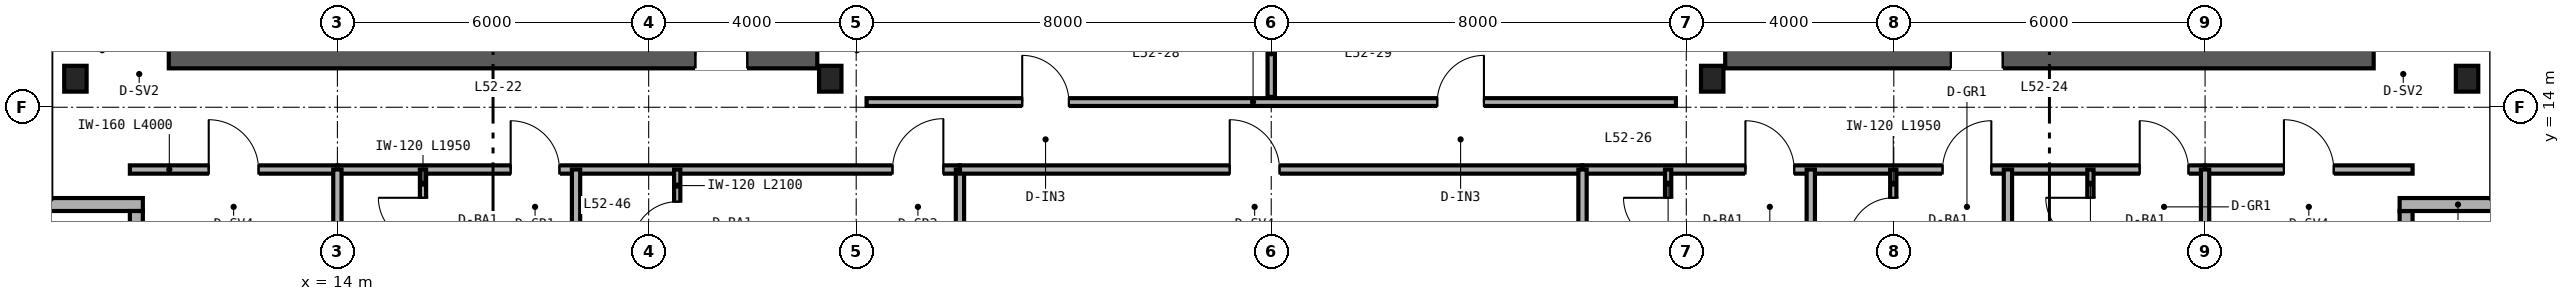
"""IFC4 building model, lengths in metres.
Left out: names, types, materials, properties, quantities, classifications, styles, units other than length and angle.
Written with IfcOpenShell. Run it as: python <this file> out.ifc"""

import sys

from ifc_helpers import new_model, si_unit, direction, frame, frame_2d, origin, origin_2d, place, context, subcontext, project, spatial, rectangle, i_section, extrude, source, transform, mapped, element, fill, save


model = new_model("IFC4")
c1 = context("Model", 3, precision=1e-05, world=origin(), true_north=direction((0.0, 1.0)))
c2 = subcontext(c1, "Body", "Model", "MODEL_VIEW")
j1 = project(units=[si_unit("LENGTHUNIT", "METRE"), si_unit("PLANEANGLEUNIT", "RADIAN")], contexts=[c1])
p1 = place(None, origin())
s1 = spatial("IfcSite", under=j1, at=p1, CompositionType="ELEMENT")
p2 = place(p1, origin())
s2 = spatial("IfcBuilding", under=s1, at=p2, CompositionType="ELEMENT")
p3 = place(p2, frame((0.0, 0.0, 206.4)))
s3 = spatial("IfcBuildingStorey", under=s2, at=p3, CompositionType="ELEMENT", Elevation=206.4)
p4 = place(p3, frame((10.75, 15.0, 0.0), z_axis=(0.0, 0.0, 1.0), x_axis=(1.0, 0.0, 0.0)))
e1 = element("IfcWall", 1, at=p4, inside=s3, PredefinedType="SHEAR", context=c2, shape_type="SweptSolid", body=[
    extrude(rectangle(XDim=12.5, YDim=0.5, at=frame_2d((6.25, 0.0))), origin(), (0.0, 0.0, 1.0), 3.37),
])
p5 = place(p4, frame((10.15, 0.0, 0.0)))
e2 = element("IfcOpeningElement", 2, at=p5, cuts=e1, PredefinedType="OPENING", context=c2, shape_type="SweptSolid", body=[
    extrude(rectangle(XDim=1.0, YDim=2.15, at=frame_2d((0.5, 1.075))), frame((0.0, 0.26, 0.0), z_axis=(0.0, -1.0, 0.0), x_axis=(1.0, 0.0, 0.0)), (0.0, 0.0, 1.0), 0.52),
])
p6 = place(p3, frame((40.75, 15.0, 0.0), z_axis=(0.0, 0.0, 1.0), x_axis=(1.0, 0.0, 0.0)))
e3 = element("IfcWall", 3, at=p6, inside=s3, PredefinedType="SHEAR", context=c2, shape_type="SweptSolid", body=[
    extrude(rectangle(XDim=12.5, YDim=0.5, at=frame_2d((6.25, 0.0))), origin(), (0.0, 0.0, 1.0), 3.37),
])
p7 = place(p6, frame((4.35, 0.0, 0.0)))
e4 = element("IfcOpeningElement", 4, at=p7, cuts=e3, PredefinedType="OPENING", context=c2, shape_type="SweptSolid", body=[
    extrude(rectangle(XDim=1.0, YDim=2.15, at=frame_2d((0.5, 1.075))), frame((0.0, 0.26, 0.0), z_axis=(0.0, -1.0, 0.0), x_axis=(1.0, 0.0, 0.0)), (0.0, 0.0, 1.0), 0.52),
])
m1 = source(origin(), c2, "Body", "SweptSolid", [
    extrude(i_section(OverallWidth=0.432, OverallDepth=0.498, WebThickness=0.056, FlangeThickness=0.089, FilletRadius=0.025, at=origin_2d()), origin(), (0.0, 0.0, 1.0), 3.37),
])
for number, where, z_axis, x_axis in (
    (5, (8.95, 14.55, 0.0), (0.0, 0.0, 1.0), (1.0, 0.0, 0.0)),
    (6, (23.5, 14.55, 0.0), (0.0, 0.0, 1.0), (1.0, 0.0, 0.0)),
    (7, (40.5, 14.55, 0.0), (0.0, 0.0, 1.0), (1.0, 0.0, 0.0)),
    (8, (55.05, 14.55, 0.0), (0.0, 0.0, 1.0), (1.0, 0.0, 0.0)),
):
    element("IfcColumn", number, at=place(p3, frame(where, z_axis=z_axis, x_axis=x_axis)), inside=s3, PredefinedType="COLUMN", context=c2, shape_type="MappedRepresentation", body=[
        mapped(m1, transform((0.0, 0.0, 0.0), scale=1.0)),
    ])
p8 = place(p3, frame((53.875, 10.0, 0.0), z_axis=(0.0, 0.0, 1.0), x_axis=(0.0, 1.0, 0.0)))
e9 = element("IfcWall", 9, at=p8, inside=s3, PredefinedType="SOLIDWALL", context=c2, shape_type="SweptSolid", body=[
    extrude(rectangle(XDim=2.0, YDim=0.25, at=frame_2d((1.0, 0.0))), origin(), (0.0, 0.0, 1.0), 3.37),
])
for number, where, z_axis, x_axis in (
    (10, (53.75, 12.125, 0.0), (0.0, 0.0, 1.0), (1.0, 0.0, 0.0)),
    (11, (8.0, 12.125, 0.0), (0.0, 0.0, 1.0), (1.0, 0.0, 0.0)),
):
    element("IfcWall", number, at=place(p3, frame(where, z_axis=z_axis, x_axis=x_axis)), inside=s3, PredefinedType="SOLIDWALL", context=c2, shape_type="SweptSolid", body=[
        extrude(rectangle(XDim=2.25, YDim=0.25, at=frame_2d((1.125, 0.0))), origin(), (0.0, 0.0, 1.0), 3.37),
    ])
p9 = place(p3, frame((10.125, 12.0, 0.0), z_axis=(0.0, 0.0, 1.0), x_axis=(0.0, -1.0, 0.0)))
e12 = element("IfcWall", 12, at=p9, inside=s3, PredefinedType="SOLIDWALL", context=c2, shape_type="SweptSolid", body=[
    extrude(rectangle(XDim=2.0, YDim=0.25, at=frame_2d((1.0, 0.0))), origin(), (0.0, 0.0, 1.0), 3.37),
])
p10 = place(p3, frame((24.2, 14.1, 0.0), z_axis=(0.0, 0.0, 1.0), x_axis=(1.0, 0.0, 0.0)))
e13 = element("IfcWall", 13, at=p10, inside=s3, PredefinedType="PARTITIONING", context=c2, shape_type="SweptSolid", body=[
    extrude(rectangle(XDim=15.6, YDim=0.15, at=frame_2d((7.8, 0.0))), origin(), (0.0, 0.0, 1.0), 3.37),
])
p11 = place(p10, frame((3.0, 0.0, 0.0)))
e14 = element("IfcOpeningElement", 14, at=p11, cuts=e13, PredefinedType="OPENING", context=c2, shape_type="SweptSolid", body=[
    extrude(rectangle(XDim=0.9, YDim=2.15, at=frame_2d((0.45, 1.075))), frame((0.0, 0.085, 0.0), z_axis=(0.0, -1.0, 0.0), x_axis=(1.0, 0.0, 0.0)), (0.0, 0.0, 1.0), 0.17),
])
p12 = place(p10, frame((11.0, 0.0, 0.0)))
e15 = element("IfcOpeningElement", 15, at=p12, cuts=e13, PredefinedType="OPENING", context=c2, shape_type="SweptSolid", body=[
    extrude(rectangle(XDim=0.9, YDim=2.15, at=frame_2d((0.45, 1.075))), frame((0.0, 0.085, 0.0), z_axis=(0.0, -1.0, 0.0), x_axis=(1.0, 0.0, 0.0)), (0.0, 0.0, 1.0), 0.17),
])
p13 = place(p3, frame((32.0, 14.2, 0.0), z_axis=(0.0, 0.0, 1.0), x_axis=(0.0, 1.0, 0.0)))
e16 = element("IfcWall", 16, at=p13, inside=s3, PredefinedType="PARTITIONING", context=c2, shape_type="SweptSolid", body=[
    extrude(rectangle(XDim=1.68, YDim=0.142, at=frame_2d((0.84, 0.0))), origin(), (0.0, 0.0, 1.0), 3.37),
])
p14 = place(p3, frame((10.0, 12.8, 0.0), z_axis=(0.0, 0.0, 1.0), x_axis=(1.0, 0.0, 0.0)))
e17 = element("IfcWall", 17, at=p14, inside=s3, PredefinedType="PARTITIONING", context=c2, shape_type="SweptSolid", body=[
    extrude(rectangle(XDim=4.0, YDim=0.16, at=frame_2d((2.0, 0.0))), origin(), (0.0, 0.0, 1.0), 3.37),
])
p15 = place(p14, frame((1.52, 0.0, 0.0)))
e18 = element("IfcOpeningElement", 18, at=p15, cuts=e17, PredefinedType="OPENING", context=c2, shape_type="SweptSolid", body=[
    extrude(rectangle(XDim=0.96, YDim=2.15, at=frame_2d((0.48, 1.075))), frame((0.0, 0.09, 0.0), z_axis=(0.0, -1.0, 0.0), x_axis=(1.0, 0.0, 0.0)), (0.0, 0.0, 1.0), 0.18),
])
p16 = place(p3, frame((50.0, 12.8, 0.0), z_axis=(0.0, 0.0, 1.0), x_axis=(1.0, 0.0, 0.0)))
e19 = element("IfcWall", 19, at=p16, inside=s3, PredefinedType="PARTITIONING", context=c2, shape_type="SweptSolid", body=[
    extrude(rectangle(XDim=4.0, YDim=0.16, at=frame_2d((2.0, 0.0))), origin(), (0.0, 0.0, 1.0), 3.37),
])
p17 = place(p16, frame((1.52, 0.0, 0.0)))
e20 = element("IfcOpeningElement", 20, at=p17, cuts=e19, PredefinedType="OPENING", context=c2, shape_type="SweptSolid", body=[
    extrude(rectangle(XDim=0.96, YDim=2.15, at=frame_2d((0.48, 1.075))), frame((0.0, 0.09, 0.0), z_axis=(0.0, -1.0, 0.0), x_axis=(1.0, 0.0, 0.0)), (0.0, 0.0, 1.0), 0.18),
])
p18 = place(p3, frame((14.0, 12.8, 0.0), z_axis=(0.0, 0.0, 1.0), x_axis=(1.0, 0.0, 0.0)))
e21 = element("IfcWall", 21, at=p18, inside=s3, PredefinedType="PARTITIONING", context=c2, shape_type="SweptSolid", body=[
    extrude(rectangle(XDim=12.0, YDim=0.16, at=frame_2d((6.0, 0.0))), origin(), (0.0, 0.0, 1.0), 2.913),
])
p19 = place(p18, frame((3.34, 0.0, 0.0)))
e22 = element("IfcOpeningElement", 22, at=p19, cuts=e21, PredefinedType="OPENING", context=c2, shape_type="SweptSolid", body=[
    extrude(rectangle(XDim=0.94, YDim=2.15, at=frame_2d((0.47, 1.075))), frame((0.0, 0.09, 0.0), z_axis=(0.0, -1.0, 0.0), x_axis=(1.0, 0.0, 0.0)), (0.0, 0.0, 1.0), 0.18),
])
p20 = place(p18, frame((10.7, 0.0, 0.0)))
e23 = element("IfcOpeningElement", 23, at=p20, cuts=e21, PredefinedType="OPENING", context=c2, shape_type="SweptSolid", body=[
    extrude(rectangle(XDim=0.98, YDim=2.2, at=frame_2d((0.49, 1.1))), frame((0.0, 0.09, 0.0), z_axis=(0.0, -1.0, 0.0), x_axis=(1.0, 0.0, 0.0)), (0.0, 0.0, 1.0), 0.18),
])
p21 = place(p3, frame((14.0, 6.36, 0.0), z_axis=(0.0, 0.0, 1.0), x_axis=(0.0, 1.0, 0.0)))
e24 = element("IfcWall", 24, at=p21, inside=s3, PredefinedType="PARTITIONING", context=c2, shape_type="SweptSolid", body=[
    extrude(rectangle(XDim=6.44, YDim=0.16, at=frame_2d((3.22, 0.0))), origin(), (0.0, 0.0, 1.0), 2.677),
])
p22 = place(p3, frame((26.0, 6.36, 0.0), z_axis=(0.0, 0.0, 1.0), x_axis=(0.0, 1.0, 0.0)))
e25 = element("IfcWall", 25, at=p22, inside=s3, PredefinedType="PARTITIONING", context=c2, shape_type="SweptSolid", body=[
    extrude(rectangle(XDim=6.44, YDim=0.16, at=frame_2d((3.22, 0.0))), origin(), (0.0, 0.0, 1.0), 2.443),
])
p23 = place(p3, frame((18.6, 6.36, 0.0), z_axis=(0.0, 0.0, 1.0), x_axis=(0.0, 1.0, 0.0)))
e26 = element("IfcWall", 26, at=p23, inside=s3, PredefinedType="PARTITIONING", context=c2, shape_type="SweptSolid", body=[
    extrude(rectangle(XDim=6.44, YDim=0.16, at=frame_2d((3.22, 0.0))), origin(), (0.0, 0.0, 1.0), 2.677),
])
p24 = place(p3, frame((15.65, 10.85, 0.0), z_axis=(0.0, 0.0, 1.0), x_axis=(0.0, 1.0, 0.0)))
e27 = element("IfcWall", 27, at=p24, inside=s3, PredefinedType="PARTITIONING", context=c2, shape_type="SweptSolid", body=[
    extrude(rectangle(XDim=1.95, YDim=0.12, at=frame_2d((0.975, 0.0))), origin(), (0.0, 0.0, 1.0), 3.37),
])
p25 = place(p24, frame((0.545, 0.0, 0.0)))
e28 = element("IfcOpeningElement", 28, at=p25, cuts=e27, PredefinedType="OPENING", context=c2, shape_type="SweptSolid", body=[
    extrude(rectangle(XDim=0.86, YDim=2.1, at=frame_2d((0.43, 1.05))), frame((0.0, 0.07, 0.0), z_axis=(0.0, -1.0, 0.0), x_axis=(1.0, 0.0, 0.0)), (0.0, 0.0, 1.0), 0.14),
])
p26 = place(p3, frame((20.55, 10.7, 0.0), z_axis=(0.0, 0.0, 1.0), x_axis=(0.0, 1.0, 0.0)))
e29 = element("IfcWall", 29, at=p26, inside=s3, PredefinedType="PARTITIONING", context=c2, shape_type="SweptSolid", body=[
    extrude(rectangle(XDim=2.1, YDim=0.12, at=frame_2d((1.05, 0.0))), origin(), (0.0, 0.0, 1.0), 3.37),
])
p27 = place(p26, frame((0.62, 0.0, 0.0)))
e30 = element("IfcOpeningElement", 30, at=p27, cuts=e29, PredefinedType="OPENING", context=c2, shape_type="SweptSolid", body=[
    extrude(rectangle(XDim=0.86, YDim=2.1, at=frame_2d((0.43, 1.05))), frame((0.0, 0.07, 0.0), z_axis=(0.0, -1.0, 0.0), x_axis=(1.0, 0.0, 0.0)), (0.0, 0.0, 1.0), 0.14),
])
p28 = place(p3, frame((26.0, 12.8, 0.0), z_axis=(0.0, 0.0, 1.0), x_axis=(1.0, 0.0, 0.0)))
e31 = element("IfcWall", 31, at=p28, inside=s3, PredefinedType="PARTITIONING", context=c2, shape_type="SweptSolid", body=[
    extrude(rectangle(XDim=12.0, YDim=0.16, at=frame_2d((6.0, 0.0))), origin(), (0.0, 0.0, 1.0), 3.37),
])
p29 = place(p28, frame((5.2, 0.0, 0.0)))
e32 = element("IfcOpeningElement", 32, at=p29, cuts=e31, PredefinedType="OPENING", context=c2, shape_type="SweptSolid", body=[
    extrude(rectangle(XDim=0.96, YDim=2.15, at=frame_2d((0.48, 1.075))), frame((0.0, 0.09, 0.0), z_axis=(0.0, -1.0, 0.0), x_axis=(1.0, 0.0, 0.0)), (0.0, 0.0, 1.0), 0.18),
])
p30 = place(p3, frame((38.0, 12.8, 0.0), z_axis=(0.0, 0.0, 1.0), x_axis=(1.0, 0.0, 0.0)))
e33 = element("IfcWall", 33, at=p30, inside=s3, PredefinedType="PARTITIONING", context=c2, shape_type="SweptSolid", body=[
    extrude(rectangle(XDim=12.0, YDim=0.16, at=frame_2d((6.0, 0.0))), origin(), (0.0, 0.0, 1.0), 2.913),
])
p31 = place(p30, frame((3.14, 0.0, 0.0)))
e34 = element("IfcOpeningElement", 34, at=p31, cuts=e33, PredefinedType="OPENING", context=c2, shape_type="SweptSolid", body=[
    extrude(rectangle(XDim=0.94, YDim=2.15, at=frame_2d((0.47, 1.075))), frame((0.0, 0.09, 0.0), z_axis=(0.0, -1.0, 0.0), x_axis=(1.0, 0.0, 0.0)), (0.0, 0.0, 1.0), 0.18),
])
p32 = place(p30, frame((6.94, 0.0, 0.0)))
e35 = element("IfcOpeningElement", 35, at=p32, cuts=e33, PredefinedType="OPENING", context=c2, shape_type="SweptSolid", body=[
    extrude(rectangle(XDim=0.94, YDim=2.15, at=frame_2d((0.47, 1.075))), frame((0.0, 0.09, 0.0), z_axis=(0.0, -1.0, 0.0), x_axis=(1.0, 0.0, 0.0)), (0.0, 0.0, 1.0), 0.18),
])
p33 = place(p30, frame((10.74, 0.0, 0.0)))
e36 = element("IfcOpeningElement", 36, at=p33, cuts=e33, PredefinedType="OPENING", context=c2, shape_type="SweptSolid", body=[
    extrude(rectangle(XDim=0.94, YDim=2.15, at=frame_2d((0.47, 1.075))), frame((0.0, 0.09, 0.0), z_axis=(0.0, -1.0, 0.0), x_axis=(1.0, 0.0, 0.0)), (0.0, 0.0, 1.0), 0.18),
])
p34 = place(p3, frame((38.0, 6.36, 0.0), z_axis=(0.0, 0.0, 1.0), x_axis=(0.0, 1.0, 0.0)))
e37 = element("IfcWall", 37, at=p34, inside=s3, PredefinedType="PARTITIONING", context=c2, shape_type="SweptSolid", body=[
    extrude(rectangle(XDim=6.44, YDim=0.16, at=frame_2d((3.22, 0.0))), origin(), (0.0, 0.0, 1.0), 2.443),
])
p35 = place(p3, frame((50.0, 6.36, 0.0), z_axis=(0.0, 0.0, 1.0), x_axis=(0.0, 1.0, 0.0)))
e38 = element("IfcWall", 38, at=p35, inside=s3, PredefinedType="PARTITIONING", context=c2, shape_type="SweptSolid", body=[
    extrude(rectangle(XDim=6.44, YDim=0.16, at=frame_2d((3.22, 0.0))), origin(), (0.0, 0.0, 1.0), 2.677),
])
p36 = place(p3, frame((42.4, 6.36, 0.0), z_axis=(0.0, 0.0, 1.0), x_axis=(0.0, 1.0, 0.0)))
e39 = element("IfcWall", 39, at=p36, inside=s3, PredefinedType="PARTITIONING", context=c2, shape_type="SweptSolid", body=[
    extrude(rectangle(XDim=6.44, YDim=0.16, at=frame_2d((3.22, 0.0))), origin(), (0.0, 0.0, 1.0), 2.833),
])
p37 = place(p3, frame((39.65, 10.85, 0.0), z_axis=(0.0, 0.0, 1.0), x_axis=(0.0, 1.0, 0.0)))
e40 = element("IfcWall", 40, at=p37, inside=s3, PredefinedType="PARTITIONING", context=c2, shape_type="SweptSolid", body=[
    extrude(rectangle(XDim=1.95, YDim=0.12, at=frame_2d((0.975, 0.0))), origin(), (0.0, 0.0, 1.0), 3.37),
])
p38 = place(p37, frame((0.545, 0.0, 0.0)))
e41 = element("IfcOpeningElement", 41, at=p38, cuts=e40, PredefinedType="OPENING", context=c2, shape_type="SweptSolid", body=[
    extrude(rectangle(XDim=0.86, YDim=2.1, at=frame_2d((0.43, 1.05))), frame((0.0, 0.07, 0.0), z_axis=(0.0, -1.0, 0.0), x_axis=(1.0, 0.0, 0.0)), (0.0, 0.0, 1.0), 0.14),
])
p39 = place(p3, frame((46.2, 6.36, 0.0), z_axis=(0.0, 0.0, 1.0), x_axis=(0.0, 1.0, 0.0)))
e42 = element("IfcWall", 42, at=p39, inside=s3, PredefinedType="PARTITIONING", context=c2, shape_type="SweptSolid", body=[
    extrude(rectangle(XDim=6.44, YDim=0.16, at=frame_2d((3.22, 0.0))), origin(), (0.0, 0.0, 1.0), 2.677),
])
p40 = place(p3, frame((43.99, 10.85, 0.0), z_axis=(0.0, 0.0, 1.0), x_axis=(0.0, 1.0, 0.0)))
e43 = element("IfcWall", 43, at=p40, inside=s3, PredefinedType="PARTITIONING", context=c2, shape_type="SweptSolid", body=[
    extrude(rectangle(XDim=1.95, YDim=0.12, at=frame_2d((0.975, 0.0))), origin(), (0.0, 0.0, 1.0), 3.37),
])
p41 = place(p40, frame((0.545, 0.0, 0.0)))
e44 = element("IfcOpeningElement", 44, at=p41, cuts=e43, PredefinedType="OPENING", context=c2, shape_type="SweptSolid", body=[
    extrude(rectangle(XDim=0.86, YDim=2.1, at=frame_2d((0.43, 1.05))), frame((0.0, 0.07, 0.0), z_axis=(0.0, -1.0, 0.0), x_axis=(1.0, 0.0, 0.0)), (0.0, 0.0, 1.0), 0.14),
])
p42 = place(p3, frame((47.79, 10.85, 0.0), z_axis=(0.0, 0.0, 1.0), x_axis=(0.0, 1.0, 0.0)))
e45 = element("IfcWall", 45, at=p42, inside=s3, PredefinedType="PARTITIONING", context=c2, shape_type="SweptSolid", body=[
    extrude(rectangle(XDim=1.95, YDim=0.12, at=frame_2d((0.975, 0.0))), origin(), (0.0, 0.0, 1.0), 3.37),
])
p43 = place(p42, frame((0.545, 0.0, 0.0)))
e46 = element("IfcOpeningElement", 46, at=p43, cuts=e45, PredefinedType="OPENING", context=c2, shape_type="SweptSolid", body=[
    extrude(rectangle(XDim=0.86, YDim=2.1, at=frame_2d((0.43, 1.05))), frame((0.0, 0.07, 0.0), z_axis=(0.0, -1.0, 0.0), x_axis=(1.0, 0.0, 0.0)), (0.0, 0.0, 1.0), 0.14),
])
m2 = source(origin(), c2, "Body", "SweptSolid", [
    extrude(rectangle(XDim=1.0, YDim=2.15, at=frame_2d((0.5, 1.075))), frame((0.0, 0.025, 0.0), z_axis=(0.0, -1.0, 0.0), x_axis=(1.0, 0.0, 0.0)), (0.0, 0.0, 1.0), 0.05),
])
p44 = place(p5, origin())
e47 = element("IfcDoor", 47, at=p44, inside=s3, OperationType="SINGLE_SWING_LEFT", PredefinedType="DOOR", context=c2, shape_type="MappedRepresentation", body=[
    mapped(m2, transform((0.0, 0.0, 0.0), scale=1.0)),
])
fill(e2, e47)
p45 = place(p7, origin())
e48 = element("IfcDoor", 48, at=p45, inside=s3, OperationType="SINGLE_SWING_RIGHT", PredefinedType="DOOR", context=c2, shape_type="MappedRepresentation", body=[
    mapped(m2, transform((0.0, 0.0, 0.0), scale=1.0)),
])
fill(e4, e48)
m3 = source(origin(), c2, "Body", "SweptSolid", [
    extrude(rectangle(XDim=0.9, YDim=2.15, at=frame_2d((0.45, 1.075))), frame((0.0, 0.025, 0.0), z_axis=(0.0, -1.0, 0.0), x_axis=(1.0, 0.0, 0.0)), (0.0, 0.0, 1.0), 0.05),
])
p46 = place(p11, origin())
e49 = element("IfcDoor", 49, at=p46, inside=s3, OperationType="SINGLE_SWING_LEFT", PredefinedType="DOOR", context=c2, shape_type="MappedRepresentation", body=[
    mapped(m3, transform((0.0, 0.0, 0.0), scale=1.0)),
])
fill(e14, e49)
p47 = place(p12, origin())
e50 = element("IfcDoor", 50, at=p47, inside=s3, OperationType="SINGLE_SWING_RIGHT", PredefinedType="DOOR", context=c2, shape_type="MappedRepresentation", body=[
    mapped(m3, transform((0.0, 0.0, 0.0), scale=1.0)),
])
fill(e15, e50)
m4 = source(origin(), c2, "Body", "SweptSolid", [
    extrude(rectangle(XDim=0.96, YDim=2.15, at=frame_2d((0.48, 1.075))), frame((0.0, 0.025, 0.0), z_axis=(0.0, -1.0, 0.0), x_axis=(1.0, 0.0, 0.0)), (0.0, 0.0, 1.0), 0.05),
])
p48 = place(p15, origin())
e51 = element("IfcDoor", 51, at=p48, inside=s3, OperationType="SINGLE_SWING_LEFT", PredefinedType="DOOR", context=c2, shape_type="MappedRepresentation", body=[
    mapped(m4, transform((0.0, 0.0, 0.0), scale=1.0)),
])
fill(e18, e51)
p49 = place(p17, origin())
e52 = element("IfcDoor", 52, at=p49, inside=s3, OperationType="SINGLE_SWING_LEFT", PredefinedType="DOOR", context=c2, shape_type="MappedRepresentation", body=[
    mapped(m4, transform((0.0, 0.0, 0.0), scale=1.0)),
])
fill(e20, e52)
m5 = source(origin(), c2, "Body", "SweptSolid", [
    extrude(rectangle(XDim=0.86, YDim=2.1, at=frame_2d((0.43, 1.05))), frame((0.0, 0.025, 0.0), z_axis=(0.0, -1.0, 0.0), x_axis=(1.0, 0.0, 0.0)), (0.0, 0.0, 1.0), 0.05),
])
p50 = place(p25, origin())
e53 = element("IfcDoor", 53, at=p50, inside=s3, OperationType="SINGLE_SWING_RIGHT", PredefinedType="DOOR", context=c2, shape_type="MappedRepresentation", body=[
    mapped(m5, transform((0.0, 0.0, 0.0), scale=1.0)),
])
fill(e28, e53)
p51 = place(p27, origin())
e54 = element("IfcDoor", 54, at=p51, inside=s3, OperationType="SINGLE_SWING_LEFT", PredefinedType="DOOR", context=c2, shape_type="MappedRepresentation", body=[
    mapped(m5, transform((0.0, 0.0, 0.0), scale=1.0)),
])
fill(e30, e54)
m6 = source(origin(), c2, "Body", "SweptSolid", [
    extrude(rectangle(XDim=0.94, YDim=2.15, at=frame_2d((0.47, 1.075))), frame((0.0, 0.025, 0.0), z_axis=(0.0, -1.0, 0.0), x_axis=(1.0, 0.0, 0.0)), (0.0, 0.0, 1.0), 0.05),
])
p52 = place(p19, origin())
e55 = element("IfcDoor", 55, at=p52, inside=s3, OperationType="SINGLE_SWING_LEFT", PredefinedType="DOOR", context=c2, shape_type="MappedRepresentation", body=[
    mapped(m6, transform((0.0, 0.0, 0.0), scale=1.0)),
])
fill(e22, e55)
m7 = source(origin(), c2, "Body", "SweptSolid", [
    extrude(rectangle(XDim=0.98, YDim=2.2, at=frame_2d((0.49, 1.1))), frame((0.0, 0.025, 0.0), z_axis=(0.0, -1.0, 0.0), x_axis=(1.0, 0.0, 0.0)), (0.0, 0.0, 1.0), 0.05),
])
p53 = place(p20, origin())
e56 = element("IfcDoor", 56, at=p53, inside=s3, OperationType="SINGLE_SWING_RIGHT", PredefinedType="DOOR", context=c2, shape_type="MappedRepresentation", body=[
    mapped(m7, transform((0.0, 0.0, 0.0), scale=1.0)),
])
fill(e23, e56)
p54 = place(p29, origin())
e57 = element("IfcDoor", 57, at=p54, inside=s3, OperationType="SINGLE_SWING_LEFT", PredefinedType="DOOR", context=c2, shape_type="MappedRepresentation", body=[
    mapped(m4, transform((0.0, 0.0, 0.0), scale=1.0)),
])
fill(e32, e57)
p55 = place(p38, origin())
e58 = element("IfcDoor", 58, at=p55, inside=s3, OperationType="SINGLE_SWING_RIGHT", PredefinedType="DOOR", context=c2, shape_type="MappedRepresentation", body=[
    mapped(m5, transform((0.0, 0.0, 0.0), scale=1.0)),
])
fill(e41, e58)
p56 = place(p41, origin())
e59 = element("IfcDoor", 59, at=p56, inside=s3, OperationType="SINGLE_SWING_LEFT", PredefinedType="DOOR", context=c2, shape_type="MappedRepresentation", body=[
    mapped(m5, transform((0.0, 0.0, 0.0), scale=1.0)),
])
fill(e44, e59)
p57 = place(p43, origin())
e60 = element("IfcDoor", 60, at=p57, inside=s3, OperationType="SINGLE_SWING_RIGHT", PredefinedType="DOOR", context=c2, shape_type="MappedRepresentation", body=[
    mapped(m5, transform((0.0, 0.0, 0.0), scale=1.0)),
])
fill(e46, e60)
p58 = place(p31, origin())
e61 = element("IfcDoor", 61, at=p58, inside=s3, OperationType="SINGLE_SWING_LEFT", PredefinedType="DOOR", context=c2, shape_type="MappedRepresentation", body=[
    mapped(m6, transform((0.0, 0.0, 0.0), scale=1.0)),
])
fill(e34, e61)
p59 = place(p32, origin())
e62 = element("IfcDoor", 62, at=p59, inside=s3, OperationType="SINGLE_SWING_RIGHT", PredefinedType="DOOR", context=c2, shape_type="MappedRepresentation", body=[
    mapped(m6, transform((0.0, 0.0, 0.0), scale=1.0)),
])
fill(e35, e62)
p60 = place(p33, origin())
e63 = element("IfcDoor", 63, at=p60, inside=s3, OperationType="SINGLE_SWING_LEFT", PredefinedType="DOOR", context=c2, shape_type="MappedRepresentation", body=[
    mapped(m6, transform((0.0, 0.0, 0.0), scale=1.0)),
])
fill(e36, e63)
save(model, sys.argv[1])
